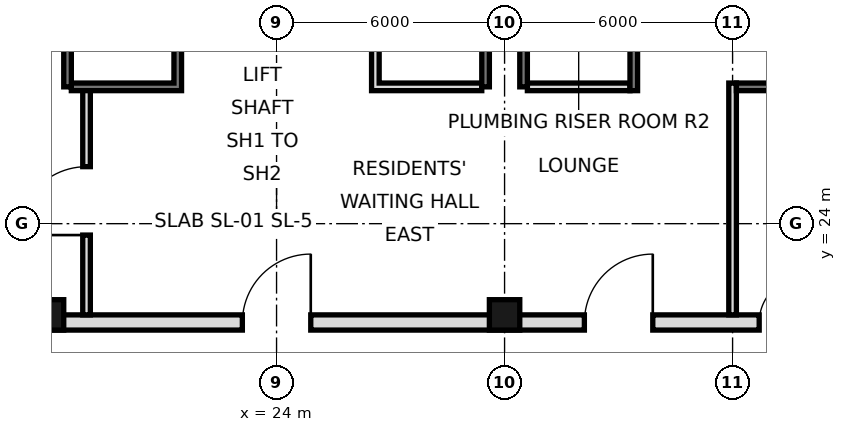
"""IFC4 building model, lengths in metres.
Left out: names, types, materials, properties, quantities, classifications, styles, units other than length and angle.
Written with IfcOpenShell. Run it as: python <this file> out.ifc"""

import sys

from ifc_helpers import new_model, si_unit, direction, frame, frame_2d, origin, origin_2d, place, context, subcontext, project, spatial, rectangle, hollow_rectangle, extrude, element, fill, save


model = new_model("IFC4")
c1 = context("Model", 3, precision=1e-05, world=origin(), true_north=direction((0.0, 1.0)))
c2 = subcontext(c1, "Body", "Model", "MODEL_VIEW")
j1 = project(units=[si_unit("LENGTHUNIT", "METRE"), si_unit("PLANEANGLEUNIT", "RADIAN")], contexts=[c1])
p1 = place(None, origin())
s1 = spatial("IfcSite", under=j1, at=p1, CompositionType="ELEMENT")
p2 = place(p1, origin())
s2 = spatial("IfcBuilding", under=s1, at=p2, CompositionType="ELEMENT")
p3 = place(p2, frame((0.0, 0.0, 25.2)))
s3 = spatial("IfcBuildingStorey", under=s2, at=p3, CompositionType="ELEMENT", Elevation=25.2)
for number, where, z_axis, x_axis in (
    (1, (18.0, 21.6, 0.0), (0.0, 0.0, 1.0), (1.0, 0.0, 0.0)),
    (2, (30.0, 21.6, 0.0), (0.0, 0.0, 1.0), (1.0, 0.0, 0.0)),
):
    element("IfcColumn", number, at=place(p3, frame(where, z_axis=z_axis, x_axis=x_axis)), inside=s3, PredefinedType="COLUMN", context=c2, shape_type="SweptSolid", body=[
        extrude(hollow_rectangle(XDim=0.8, YDim=0.8, WallThickness=0.07, at=origin_2d()), origin(), (0.0, 0.0, 1.0), 4.8),
    ])
for number, where, z_axis, x_axis in (
    (3, (18.5, 27.6, 0.0), (0.0, 0.0, 1.0), (0.0, 1.0, 0.0)),
    (4, (29.5, 27.6, 0.0), (0.0, 0.0, 1.0), (0.0, 1.0, 0.0)),
    (5, (30.5, 27.6, 0.0), (0.0, 0.0, 1.0), (0.0, 1.0, 0.0)),
):
    element("IfcWall", number, at=place(p3, frame(where, z_axis=z_axis, x_axis=x_axis)), inside=s3, PredefinedType="SOLIDWALL", context=c2, shape_type="SweptSolid", body=[
        extrude(rectangle(XDim=17.5, YDim=0.2, at=frame_2d((8.75, 0.0))), origin(), (0.0, 0.0, 1.0), 4.4),
    ])
p4 = place(p3, frame((5.6, 21.4, 0.0), z_axis=(0.0, 0.0, 1.0), x_axis=(1.0, 0.0, 0.0)))
e6 = element("IfcWall", 6, at=p4, inside=s3, PredefinedType="SOLIDWALL", context=c2, shape_type="SweptSolid", body=[
    extrude(rectangle(XDim=36.8, YDim=0.4, at=frame_2d((18.4, 0.0))), origin(), (0.0, 0.0, 1.0), 4.4),
])
p5 = place(p4, frame((8.5, 0.0, 0.0)))
e7 = element("IfcOpeningElement", 7, at=p5, cuts=e6, PredefinedType="OPENING", context=c2, shape_type="SweptSolid", body=[
    extrude(rectangle(XDim=1.8, YDim=2.1, at=frame_2d((0.9, 1.05))), frame((0.0, 0.21, 0.0), z_axis=(0.0, -1.0, 0.0), x_axis=(1.0, 0.0, 0.0)), (0.0, 0.0, 1.0), 0.42),
])
p6 = place(p4, frame((17.5, 0.0, 0.0)))
e8 = element("IfcOpeningElement", 8, at=p6, cuts=e6, PredefinedType="OPENING", context=c2, shape_type="SweptSolid", body=[
    extrude(rectangle(XDim=1.8, YDim=2.1, at=frame_2d((0.9, 1.05))), frame((0.0, 0.21, 0.0), z_axis=(0.0, -1.0, 0.0), x_axis=(1.0, 0.0, 0.0)), (0.0, 0.0, 1.0), 0.42),
])
p7 = place(p4, frame((26.5, 0.0, 0.0)))
e9 = element("IfcOpeningElement", 9, at=p7, cuts=e6, PredefinedType="OPENING", context=c2, shape_type="SweptSolid", body=[
    extrude(rectangle(XDim=1.8, YDim=2.1, at=frame_2d((0.9, 1.05))), frame((0.0, 0.21, 0.0), z_axis=(0.0, -1.0, 0.0), x_axis=(1.0, 0.0, 0.0)), (0.0, 0.0, 1.0), 0.42),
])
p8 = place(p4, frame((4.5, 0.0, 0.0)))
e10 = element("IfcOpeningElement", 10, at=p8, cuts=e6, PredefinedType="OPENING", context=c2, shape_type="SweptSolid", body=[
    extrude(rectangle(XDim=1.2, YDim=2.1, at=frame_2d((0.6, 1.05))), frame((0.0, 0.21, 0.0), z_axis=(0.0, -1.0, 0.0), x_axis=(1.0, 0.0, 0.0)), (0.0, 0.0, 1.0), 0.42),
])
p9 = place(p4, frame((31.1, 0.0, 0.0)))
e11 = element("IfcOpeningElement", 11, at=p9, cuts=e6, PredefinedType="OPENING", context=c2, shape_type="SweptSolid", body=[
    extrude(rectangle(XDim=1.2, YDim=2.1, at=frame_2d((0.6, 1.05))), frame((0.0, 0.21, 0.0), z_axis=(0.0, -1.0, 0.0), x_axis=(1.0, 0.0, 0.0)), (0.0, 0.0, 1.0), 0.42),
])
p10 = place(p3, frame((19.0, 21.6, 0.0), z_axis=(0.0, 0.0, 1.0), x_axis=(0.0, 1.0, 0.0)))
e12 = element("IfcWall", 12, at=p10, inside=s3, PredefinedType="PARTITIONING", context=c2, shape_type="SweptSolid", body=[
    extrude(rectangle(XDim=6.0, YDim=0.2, at=frame_2d((3.0, 0.0))), origin(), (0.0, 0.0, 1.0), 4.4),
])
p11 = place(p10, frame((2.1, 0.0, 0.0)))
e13 = element("IfcOpeningElement", 13, at=p11, cuts=e12, PredefinedType="OPENING", context=c2, shape_type="SweptSolid", body=[
    extrude(rectangle(XDim=1.8, YDim=2.1, at=frame_2d((0.9, 1.05))), frame((0.0, 0.11, 0.0), z_axis=(0.0, -1.0, 0.0), x_axis=(1.0, 0.0, 0.0)), (0.0, 0.0, 1.0), 0.22),
])
p12 = place(p3, frame((21.4, 27.5, 0.0), z_axis=(0.0, 0.0, 1.0), x_axis=(0.0, 1.0, 0.0)))
e14 = element("IfcWall", 14, at=p12, inside=s3, PredefinedType="SOLIDWALL", context=c2, shape_type="SweptSolid", body=[
    extrude(rectangle(XDim=17.5, YDim=0.2, at=frame_2d((8.75, 0.0))), origin(), (0.0, 0.0, 1.0), 4.4),
])
p13 = place(p12, frame((16.2, 0.0, 0.0)))
e15 = element("IfcOpeningElement", 15, at=p13, cuts=e14, PredefinedType="OPENING", context=c2, shape_type="SweptSolid", body=[
    extrude(rectangle(XDim=1.0, YDim=2.1, at=frame_2d((0.5, 1.05))), frame((0.0, 0.11, 0.0), z_axis=(0.0, -1.0, 0.0), x_axis=(1.0, 0.0, 0.0)), (0.0, 0.0, 1.0), 0.22),
])
p14 = place(p12, frame((7.4, 0.0, 0.0)))
e16 = element("IfcOpeningElement", 16, at=p14, cuts=e14, PredefinedType="OPENING", context=c2, shape_type="SweptSolid", body=[
    extrude(rectangle(XDim=0.9, YDim=2.1, at=frame_2d((0.45, 1.05))), frame((0.0, 0.11, 0.0), z_axis=(0.0, -1.0, 0.0), x_axis=(1.0, 0.0, 0.0)), (0.0, 0.0, 1.0), 0.22),
])
p15 = place(p3, frame((26.6, 27.5, 0.0), z_axis=(0.0, 0.0, 1.0), x_axis=(0.0, 1.0, 0.0)))
e17 = element("IfcWall", 17, at=p15, inside=s3, PredefinedType="SOLIDWALL", context=c2, shape_type="SweptSolid", body=[
    extrude(rectangle(XDim=17.5, YDim=0.2, at=frame_2d((8.75, 0.0))), origin(), (0.0, 0.0, 1.0), 4.4),
])
p16 = place(p15, frame((4.3, 0.0, 0.0)))
e18 = element("IfcOpeningElement", 18, at=p16, cuts=e17, PredefinedType="OPENING", context=c2, shape_type="SweptSolid", body=[
    extrude(rectangle(XDim=0.9, YDim=2.1, at=frame_2d((0.45, 1.05))), frame((0.0, 0.11, 0.0), z_axis=(0.0, -1.0, 0.0), x_axis=(1.0, 0.0, 0.0)), (0.0, 0.0, 1.0), 0.22),
])
p17 = place(p15, frame((10.35, 0.0, 0.0)))
e19 = element("IfcOpeningElement", 19, at=p17, cuts=e17, PredefinedType="OPENING", context=c2, shape_type="SweptSolid", body=[
    extrude(rectangle(XDim=1.0, YDim=2.1, at=frame_2d((0.5, 1.05))), frame((0.0, 0.11, 0.0), z_axis=(0.0, -1.0, 0.0), x_axis=(1.0, 0.0, 0.0)), (0.0, 0.0, 1.0), 0.22),
])
p18 = place(p3, frame((33.4, 27.5, 0.0), z_axis=(0.0, 0.0, 1.0), x_axis=(0.0, 1.0, 0.0)))
e20 = element("IfcWall", 20, at=p18, inside=s3, PredefinedType="SOLIDWALL", context=c2, shape_type="SweptSolid", body=[
    extrude(rectangle(XDim=17.5, YDim=0.2, at=frame_2d((8.75, 0.0))), origin(), (0.0, 0.0, 1.0), 4.4),
])
p19 = place(p18, frame((15.4, 0.0, 0.0)))
e21 = element("IfcOpeningElement", 21, at=p19, cuts=e20, PredefinedType="OPENING", context=c2, shape_type="SweptSolid", body=[
    extrude(rectangle(XDim=1.1, YDim=2.1, at=frame_2d((0.55, 1.05))), frame((0.0, 0.11, 0.0), z_axis=(0.0, -1.0, 0.0), x_axis=(1.0, 0.0, 0.0)), (0.0, 0.0, 1.0), 0.22),
])
p20 = place(p18, frame((2.7, 0.0, 0.0)))
e22 = element("IfcOpeningElement", 22, at=p20, cuts=e20, PredefinedType="OPENING", context=c2, shape_type="SweptSolid", body=[
    extrude(rectangle(XDim=1.0, YDim=2.1, at=frame_2d((0.5, 1.05))), frame((0.0, 0.11, 0.0), z_axis=(0.0, -1.0, 0.0), x_axis=(1.0, 0.0, 0.0)), (0.0, 0.0, 1.0), 0.22),
])
p21 = place(p18, frame((9.9, 0.0, 0.0)))
e23 = element("IfcOpeningElement", 23, at=p21, cuts=e20, PredefinedType="OPENING", context=c2, shape_type="SweptSolid", body=[
    extrude(rectangle(XDim=0.9, YDim=2.1, at=frame_2d((0.45, 1.05))), frame((0.0, 0.11, 0.0), z_axis=(0.0, -1.0, 0.0), x_axis=(1.0, 0.0, 0.0)), (0.0, 0.0, 1.0), 0.22),
])
p22 = place(p3, frame((36.0, 21.6, 0.0), z_axis=(0.0, 0.0, 1.0), x_axis=(0.0, 1.0, 0.0)))
e24 = element("IfcWall", 24, at=p22, inside=s3, PredefinedType="PARTITIONING", context=c2, shape_type="SweptSolid", body=[
    extrude(rectangle(XDim=6.1, YDim=0.2, at=frame_2d((3.05, 0.0))), origin(), (0.0, 0.0, 1.0), 4.4),
])
for number, where, z_axis, x_axis in (
    (25, (18.6, 27.6, 0.0), (0.0, 0.0, 1.0), (1.0, 0.0, 0.0)),
    (26, (26.7, 27.6, 0.0), (0.0, 0.0, 1.0), (1.0, 0.0, 0.0)),
):
    element("IfcWall", number, at=place(p3, frame(where, z_axis=z_axis, x_axis=x_axis)), inside=s3, PredefinedType="SOLIDWALL", context=c2, shape_type="SweptSolid", body=[
        extrude(rectangle(XDim=2.7, YDim=0.2, at=frame_2d((1.35, 0.0))), origin(), (0.0, 0.0, 1.0), 4.4),
    ])
p23 = place(p3, frame((30.6, 27.6, 0.0), z_axis=(0.0, 0.0, 1.0), x_axis=(1.0, 0.0, 0.0)))
e27 = element("IfcWall", 27, at=p23, inside=s3, PredefinedType="PARTITIONING", context=c2, shape_type="SweptSolid", body=[
    extrude(rectangle(XDim=2.7, YDim=0.2, at=frame_2d((1.35, 0.0))), origin(), (0.0, 0.0, 1.0), 4.4),
])
p24 = place(p3, frame((36.1, 27.6, 0.0), z_axis=(0.0, 0.0, 1.0), x_axis=(1.0, 0.0, 0.0)))
e28 = element("IfcWall", 28, at=p24, inside=s3, PredefinedType="SOLIDWALL", context=c2, shape_type="SweptSolid", body=[
    extrude(rectangle(XDim=5.3, YDim=0.2, at=frame_2d((2.65, 0.0))), origin(), (0.0, 0.0, 1.0), 4.4),
])
p25 = place(p11, origin())
e29 = element("IfcDoor", 29, at=p25, inside=s3, OperationType="SINGLE_SWING_LEFT", PredefinedType="DOOR", context=c2, shape_type="SweptSolid", body=[
    extrude(rectangle(XDim=1.8, YDim=2.1, at=frame_2d((0.9, 1.05))), frame((0.0, 0.025, 0.0), z_axis=(0.0, -1.0, 0.0), x_axis=(1.0, 0.0, 0.0)), (0.0, 0.0, 1.0), 0.05),
])
fill(e13, e29)
p26 = place(p6, frame((1.8, 0.0, 0.0), z_axis=(0.0, 0.0, 1.0), x_axis=(-1.0, 0.0, 0.0)))
e30 = element("IfcDoor", 30, at=p26, inside=s3, OperationType="SINGLE_SWING_LEFT", PredefinedType="DOOR", context=c2, shape_type="SweptSolid", body=[
    extrude(rectangle(XDim=1.8, YDim=2.1, at=frame_2d((0.9, 1.05))), frame((0.0, 0.025, 0.0), z_axis=(0.0, -1.0, 0.0), x_axis=(1.0, 0.0, 0.0)), (0.0, 0.0, 1.0), 0.05),
])
fill(e8, e30)
p27 = place(p7, frame((1.8, 0.0, 0.0), z_axis=(0.0, 0.0, 1.0), x_axis=(-1.0, 0.0, 0.0)))
e31 = element("IfcDoor", 31, at=p27, inside=s3, OperationType="SINGLE_SWING_LEFT", PredefinedType="DOOR", context=c2, shape_type="SweptSolid", body=[
    extrude(rectangle(XDim=1.8, YDim=2.1, at=frame_2d((0.9, 1.05))), frame((0.0, 0.025, 0.0), z_axis=(0.0, -1.0, 0.0), x_axis=(1.0, 0.0, 0.0)), (0.0, 0.0, 1.0), 0.05),
])
fill(e9, e31)
p28 = place(p9, frame((1.2, 0.0, 0.0), z_axis=(0.0, 0.0, 1.0), x_axis=(-1.0, 0.0, 0.0)))
e32 = element("IfcDoor", 32, at=p28, inside=s3, OperationType="SINGLE_SWING_LEFT", PredefinedType="DOOR", context=c2, shape_type="SweptSolid", body=[
    extrude(rectangle(XDim=1.2, YDim=2.1, at=frame_2d((0.6, 1.05))), frame((0.0, 0.025, 0.0), z_axis=(0.0, -1.0, 0.0), x_axis=(1.0, 0.0, 0.0)), (0.0, 0.0, 1.0), 0.05),
])
fill(e11, e32)
save(model, sys.argv[1])
